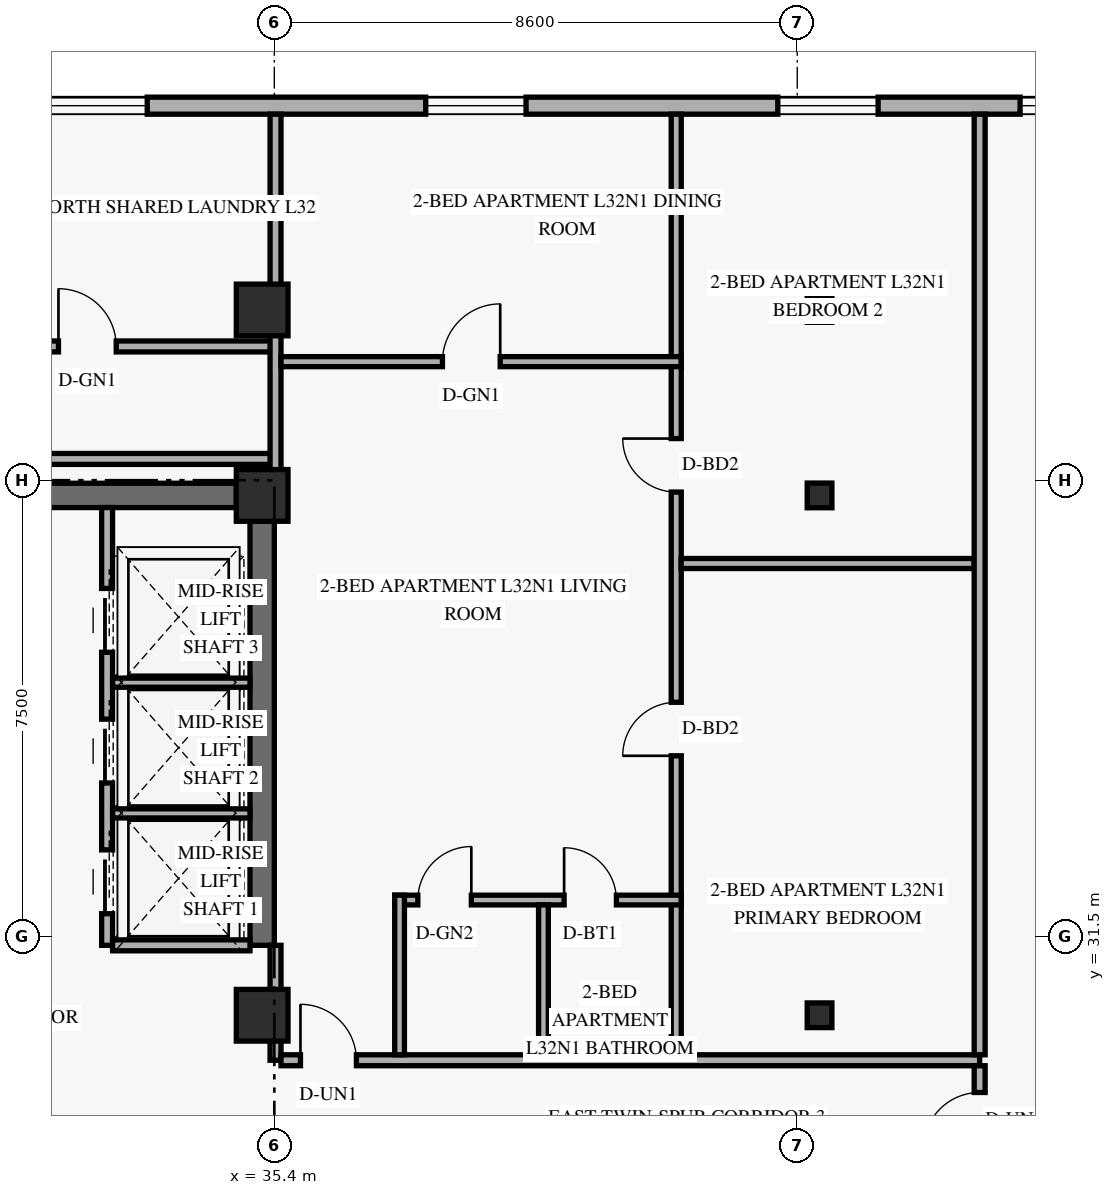
"""IFC4 building model, lengths in metres.
Left out: names, types, materials, properties, quantities, classifications, styles, units other than length and angle.
Written with IfcOpenShell. Run it as: python <this file> out.ifc"""

import sys

from ifc_helpers import new_model, si_unit, direction, frame, frame_2d, origin, origin_2d, place, context, subcontext, project, spatial, rectangle, hollow_rectangle, extrude, element, fill, save


model = new_model("IFC4")
c1 = context("Model", 3, precision=1e-05, world=origin(), true_north=direction((0.0, 1.0)))
c2 = subcontext(c1, "Body", "Model", "MODEL_VIEW")
j1 = project(units=[si_unit("LENGTHUNIT", "METRE"), si_unit("PLANEANGLEUNIT", "RADIAN")], contexts=[c1])
p1 = place(None, origin())
s1 = spatial("IfcSite", under=j1, at=p1, CompositionType="ELEMENT")
p2 = place(p1, origin())
s2 = spatial("IfcBuilding", under=s1, at=p2, CompositionType="ELEMENT")
p3 = place(p2, frame((0.0, 0.0, 124.8)))
s3 = spatial("IfcBuildingStorey", under=s2, at=p3, CompositionType="ELEMENT", Elevation=124.8)
p4 = place(p3, frame((35.2, 31.35, 0.0), z_axis=(0.0, 0.0, 1.0), x_axis=(0.0, 1.0, 0.0)))
e1 = element("IfcWall", 1, at=p4, inside=s3, PredefinedType="SHEAR", context=c2, shape_type="SweptSolid", body=[
    extrude(rectangle(XDim=6.975, YDim=0.4, at=frame_2d((3.487, 0.0))), origin(), (0.0, 0.0, 1.0), 2.749),
])
p5 = place(p3, frame((24.625, 38.75, 0.0), z_axis=(0.0, 0.0, 1.0), x_axis=(1.0, 0.0, 0.0)))
e2 = element("IfcWall", 2, at=p5, inside=s3, PredefinedType="SHEAR", context=c2, shape_type="SweptSolid", body=[
    extrude(rectangle(XDim=10.15, YDim=0.4, at=frame_2d((5.075, 0.0))), origin(), (0.0, 0.0, 1.0), 3.36),
])
p6 = place(p5, frame((5.2, 0.0, 0.0)))
e3 = element("IfcOpeningElement", 3, at=p6, cuts=e2, PredefinedType="OPENING", context=c2, shape_type="SweptSolid", body=[
    extrude(rectangle(XDim=1.05, YDim=2.15, at=frame_2d((0.525, 1.075))), frame((0.0, 0.21, 0.0), z_axis=(0.0, -1.0, 0.0), x_axis=(1.0, 0.0, 0.0)), (0.0, 0.0, 1.0), 0.42),
])
for number, where, z_axis, x_axis in (
    (4, (35.2, 30.2, 0.0), (0.0, 0.0, 1.0), (1.0, 0.0, 0.0)),
    (5, (35.2, 38.75, 0.0), (0.0, 0.0, 1.0), (1.0, 0.0, 0.0)),
    (6, (35.2, 41.8, 0.0), (0.0, 0.0, 1.0), (1.0, 0.0, 0.0)),
):
    element("IfcColumn", number, at=place(p3, frame(where, z_axis=z_axis, x_axis=x_axis)), inside=s3, PredefinedType="COLUMN", context=c2, shape_type="SweptSolid", body=[
        extrude(rectangle(XDim=0.85, YDim=0.85, at=origin_2d()), origin(), (0.0, 0.0, 1.0), 3.6),
    ])
for number, where, z_axis, x_axis in (
    (7, (44.304, 30.2, 0.0), (0.035, 0.0, 0.999), (0.0, 1.0, 0.0)),
    (8, (44.304, 38.75, 0.0), (0.035, 0.0, 0.999), (0.0, 1.0, 0.0)),
    (9, (44.304, 41.8, 0.0), (0.035, 0.0, 0.999), (0.0, 1.0, 0.0)),
):
    element("IfcColumn", number, at=place(p3, frame(where, z_axis=z_axis, x_axis=x_axis)), inside=s3, PredefinedType="COLUMN", context=c2, shape_type="SweptSolid", body=[
        extrude(hollow_rectangle(XDim=0.406, YDim=0.406, WallThickness=0.016, at=origin_2d()), origin(), (0.0, 0.0, 1.0), 3.602),
    ])
p7 = place(p3, frame((49.98, 45.16, 0.0), z_axis=(0.0, 0.0, 1.0), x_axis=(-1.0, 0.0, 0.0)))
e10 = element("IfcWall", 10, at=p7, inside=s3, PredefinedType="SOLIDWALL", context=c2, shape_type="SweptSolid", body=[
    extrude(rectangle(XDim=36.56, YDim=0.28, at=frame_2d((18.28, 0.0))), origin(), (0.0, 0.0, 1.0), 3.36),
])
p8 = place(p7, frame((31.62, 0.0, 0.85)))
e11 = element("IfcOpeningElement", 11, at=p8, cuts=e10, PredefinedType="OPENING", context=c2, shape_type="SweptSolid", body=[
    extrude(rectangle(XDim=1.65, YDim=1.6, at=frame_2d((0.825, 0.8))), frame((0.0, 0.15, 0.0), z_axis=(0.0, -1.0, 0.0), x_axis=(1.0, 0.0, 0.0)), (0.0, 0.0, 1.0), 0.3),
])
p9 = place(p7, frame((23.555, 0.0, 0.85)))
e12 = element("IfcOpeningElement", 12, at=p9, cuts=e10, PredefinedType="OPENING", context=c2, shape_type="SweptSolid", body=[
    extrude(rectangle(XDim=1.65, YDim=1.6, at=frame_2d((0.825, 0.8))), frame((0.0, 0.15, 0.0), z_axis=(0.0, -1.0, 0.0), x_axis=(1.0, 0.0, 0.0)), (0.0, 0.0, 1.0), 0.3),
])
p10 = place(p7, frame((16.67, 0.0, 0.85)))
e13 = element("IfcOpeningElement", 13, at=p10, cuts=e10, PredefinedType="OPENING", context=c2, shape_type="SweptSolid", body=[
    extrude(rectangle(XDim=1.65, YDim=1.6, at=frame_2d((0.825, 0.8))), frame((0.0, 0.15, 0.0), z_axis=(0.0, -1.0, 0.0), x_axis=(1.0, 0.0, 0.0)), (0.0, 0.0, 1.0), 0.3),
])
p11 = place(p7, frame((10.44, 0.0, 0.85)))
e14 = element("IfcOpeningElement", 14, at=p11, cuts=e10, PredefinedType="OPENING", context=c2, shape_type="SweptSolid", body=[
    extrude(rectangle(XDim=1.65, YDim=1.6, at=frame_2d((0.825, 0.8))), frame((0.0, 0.15, 0.0), z_axis=(0.0, -1.0, 0.0), x_axis=(1.0, 0.0, 0.0)), (0.0, 0.0, 1.0), 0.3),
])
p12 = place(p7, frame((4.65, 0.0, 0.85)))
e15 = element("IfcOpeningElement", 15, at=p12, cuts=e10, PredefinedType="OPENING", context=c2, shape_type="SweptSolid", body=[
    extrude(rectangle(XDim=1.65, YDim=1.6, at=frame_2d((0.825, 0.8))), frame((0.0, 0.15, 0.0), z_axis=(0.0, -1.0, 0.0), x_axis=(1.0, 0.0, 0.0)), (0.0, 0.0, 1.0), 0.3),
])
p13 = place(p7, frame((0.665, 0.0, 0.85)))
e16 = element("IfcOpeningElement", 16, at=p13, cuts=e10, PredefinedType="OPENING", context=c2, shape_type="SweptSolid", body=[
    extrude(rectangle(XDim=1.65, YDim=1.6, at=frame_2d((0.825, 0.8))), frame((0.0, 0.15, 0.0), z_axis=(0.0, -1.0, 0.0), x_axis=(1.0, 0.0, 0.0)), (0.0, 0.0, 1.0), 0.3),
])
p14 = place(p3, frame((32.65, 31.35, 0.0), z_axis=(0.0, 0.0, 1.0), x_axis=(0.0, 1.0, 0.0)))
e17 = element("IfcWall", 17, at=p14, inside=s3, PredefinedType="STANDARD", context=c2, shape_type="SweptSolid", body=[
    extrude(rectangle(XDim=7.2, YDim=0.18, at=frame_2d((3.6, 0.0))), origin(), (0.0, 0.0, 1.0), 3.36),
])
p15 = place(p14, frame((0.52, 0.0, 0.0)))
e18 = element("IfcOpeningElement", 18, at=p15, cuts=e17, PredefinedType="OPENING", context=c2, shape_type="SweptSolid", body=[
    extrude(rectangle(XDim=1.05, YDim=2.2, at=frame_2d((0.525, 1.1))), frame((0.0, 0.1, 0.0), z_axis=(0.0, -1.0, 0.0), x_axis=(1.0, 0.0, 0.0)), (0.0, 0.0, 1.0), 0.2),
])
p16 = place(p14, frame((2.67, 0.0, 0.0)))
e19 = element("IfcOpeningElement", 19, at=p16, cuts=e17, PredefinedType="OPENING", context=c2, shape_type="SweptSolid", body=[
    extrude(rectangle(XDim=1.05, YDim=2.2, at=frame_2d((0.525, 1.1))), frame((0.0, 0.1, 0.0), z_axis=(0.0, -1.0, 0.0), x_axis=(1.0, 0.0, 0.0)), (0.0, 0.0, 1.0), 0.2),
])
p17 = place(p14, frame((4.82, 0.0, 0.0)))
e20 = element("IfcOpeningElement", 20, at=p17, cuts=e17, PredefinedType="OPENING", context=c2, shape_type="SweptSolid", body=[
    extrude(rectangle(XDim=1.05, YDim=2.2, at=frame_2d((0.525, 1.1))), frame((0.0, 0.1, 0.0), z_axis=(0.0, -1.0, 0.0), x_axis=(1.0, 0.0, 0.0)), (0.0, 0.0, 1.0), 0.2),
])
p18 = place(p3, frame((32.74, 31.35, 0.0), z_axis=(0.0, 0.0, 1.0), x_axis=(1.0, 0.0, 0.0)))
e21 = element("IfcWall", 21, at=p18, inside=s3, PredefinedType="STANDARD", context=c2, shape_type="SweptSolid", body=[
    extrude(rectangle(XDim=2.26, YDim=0.18, at=frame_2d((1.13, 0.0))), origin(), (0.0, 0.0, 1.0), 3.36),
])
for number, where, z_axis, x_axis in (
    (22, (32.74, 33.52, 0.0), (0.0, 0.0, 1.0), (1.0, 0.0, 0.0)),
    (23, (32.74, 35.67, 0.0), (0.0, 0.0, 1.0), (1.0, 0.0, 0.0)),
):
    element("IfcWall", number, at=place(p3, frame(where, z_axis=z_axis, x_axis=x_axis)), inside=s3, PredefinedType="STANDARD", context=c2, shape_type="SweptSolid", body=[
        extrude(rectangle(XDim=2.26, YDim=0.15, at=frame_2d((1.13, 0.0))), origin(), (0.0, 0.0, 1.0), 3.36),
    ])
p19 = place(p3, frame((35.42, 29.46, 0.0), z_axis=(0.0, 0.0, 1.0), x_axis=(0.0, 1.0, 0.0)))
e24 = element("IfcWall", 24, at=p19, inside=s3, PredefinedType="STANDARD", context=c2, shape_type="SweptSolid", body=[
    extrude(rectangle(XDim=1.89, YDim=0.18, at=frame_2d((0.945, 0.0))), origin(), (0.0, 0.0, 1.0), 2.731),
])
p20 = place(p3, frame((35.51, 29.46, 0.0), z_axis=(0.0, 0.0, 1.0), x_axis=(1.0, 0.0, 0.0)))
e25 = element("IfcWall", 25, at=p20, inside=s3, PredefinedType="STANDARD", context=c2, shape_type="SweptSolid", body=[
    extrude(rectangle(XDim=11.49, YDim=0.18, at=frame_2d((5.745, 0.0))), origin(), (0.0, 0.0, 1.0), 2.731),
])
p21 = place(p20, frame((0.32, 0.0, 0.0)))
e26 = element("IfcOpeningElement", 26, at=p21, cuts=e25, PredefinedType="OPENING", context=c2, shape_type="SweptSolid", body=[
    extrude(rectangle(XDim=0.92, YDim=2.15, at=frame_2d((0.46, 1.075))), frame((0.0, 0.1, 0.0), z_axis=(0.0, -1.0, 0.0), x_axis=(1.0, 0.0, 0.0)), (0.0, 0.0, 1.0), 0.2),
])
p22 = place(p3, frame((21.74, 41.2, 0.0), z_axis=(0.0, 0.0, 1.0), x_axis=(1.0, 0.0, 0.0)))
e27 = element("IfcWall", 27, at=p22, inside=s3, PredefinedType="STANDARD", context=c2, shape_type="SweptSolid", body=[
    extrude(rectangle(XDim=13.68, YDim=0.18, at=frame_2d((6.84, 0.0))), origin(), (0.0, 0.0, 1.0), 2.731),
])
p23 = place(p22, frame((3.09, 0.0, 0.0)))
e28 = element("IfcOpeningElement", 28, at=p23, cuts=e27, PredefinedType="OPENING", context=c2, shape_type="SweptSolid", body=[
    extrude(rectangle(XDim=0.95, YDim=2.15, at=frame_2d((0.475, 1.075))), frame((0.0, 0.1, 0.0), z_axis=(0.0, -1.0, 0.0), x_axis=(1.0, 0.0, 0.0)), (0.0, 0.0, 1.0), 0.2),
])
p24 = place(p22, frame((10.11, 0.0, 0.0)))
e29 = element("IfcOpeningElement", 29, at=p24, cuts=e27, PredefinedType="OPENING", context=c2, shape_type="SweptSolid", body=[
    extrude(rectangle(XDim=0.95, YDim=2.15, at=frame_2d((0.475, 1.075))), frame((0.0, 0.1, 0.0), z_axis=(0.0, -1.0, 0.0), x_axis=(1.0, 0.0, 0.0)), (0.0, 0.0, 1.0), 0.2),
])
p25 = place(p3, frame((23.85, 39.35, 0.0), z_axis=(0.0, 0.0, 1.0), x_axis=(1.0, 0.0, 0.0)))
e30 = element("IfcWall", 30, at=p25, inside=s3, PredefinedType="STANDARD", context=c2, shape_type="SweptSolid", body=[
    extrude(rectangle(XDim=11.57, YDim=0.18, at=frame_2d((5.785, 0.0))), origin(), (0.0, 0.0, 1.0), 2.731),
])
p26 = place(p3, frame((35.42, 38.75, 0.0), z_axis=(0.0, 0.0, 1.0), x_axis=(0.0, 1.0, 0.0)))
e31 = element("IfcWall", 31, at=p26, inside=s3, PredefinedType="PARTITIONING", context=c2, shape_type="SweptSolid", body=[
    extrude(rectangle(XDim=6.27, YDim=0.18, at=frame_2d((3.135, 0.0))), origin(), (0.0, 0.0, 1.0), 2.731),
])
p27 = place(p3, frame((42.01, 29.55, 0.0), z_axis=(0.0, 0.0, 1.0), x_axis=(0.0, 1.0, 0.0)))
e32 = element("IfcWall", 32, at=p27, inside=s3, PredefinedType="PARTITIONING", context=c2, shape_type="SweptSolid", body=[
    extrude(rectangle(XDim=15.47, YDim=0.165, at=frame_2d((7.735, 0.0))), origin(), (0.0, 0.0, 1.0), 2.731),
])
p28 = place(p27, frame((4.917, 0.0, 0.0)))
e33 = element("IfcOpeningElement", 33, at=p28, cuts=e32, PredefinedType="OPENING", context=c2, shape_type="SweptSolid", body=[
    extrude(rectangle(XDim=0.88, YDim=2.14, at=frame_2d((0.44, 1.07))), frame((0.0, 0.093, 0.0), z_axis=(0.0, -1.0, 0.0), x_axis=(1.0, 0.0, 0.0)), (0.0, 0.0, 1.0), 0.185),
])
p29 = place(p27, frame((9.255, 0.0, 0.0)))
e34 = element("IfcOpeningElement", 34, at=p29, cuts=e32, PredefinedType="OPENING", context=c2, shape_type="SweptSolid", body=[
    extrude(rectangle(XDim=0.88, YDim=2.14, at=frame_2d((0.44, 1.07))), frame((0.0, 0.093, 0.0), z_axis=(0.0, -1.0, 0.0), x_axis=(1.0, 0.0, 0.0)), (0.0, 0.0, 1.0), 0.185),
])
p30 = place(p3, frame((37.38, 32.095, 0.0), z_axis=(0.0, 0.0, 1.0), x_axis=(1.0, 0.0, 0.0)))
e35 = element("IfcWall", 35, at=p30, inside=s3, PredefinedType="PLUMBINGWALL", context=c2, shape_type="SweptSolid", body=[
    extrude(rectangle(XDim=4.71, YDim=0.16, at=frame_2d((2.355, 0.0))), origin(), (0.0, 0.0, 1.0), 3.36),
])
p31 = place(p30, frame((0.38, 0.0, 0.0)))
e36 = element("IfcOpeningElement", 36, at=p31, cuts=e35, PredefinedType="OPENING", context=c2, shape_type="SweptSolid", body=[
    extrude(rectangle(XDim=0.88, YDim=2.12, at=frame_2d((0.44, 1.06))), frame((0.0, 0.09, 0.0), z_axis=(0.0, -1.0, 0.0), x_axis=(1.0, 0.0, 0.0)), (0.0, 0.0, 1.0), 0.18),
])
p32 = place(p30, frame((2.786, 0.0, 0.0)))
e37 = element("IfcOpeningElement", 37, at=p32, cuts=e35, PredefinedType="OPENING", context=c2, shape_type="SweptSolid", body=[
    extrude(rectangle(XDim=0.86, YDim=2.12, at=frame_2d((0.43, 1.06))), frame((0.0, 0.09, 0.0), z_axis=(0.0, -1.0, 0.0), x_axis=(1.0, 0.0, 0.0)), (0.0, 0.0, 1.0), 0.18),
])
p33 = place(p3, frame((37.46, 29.55, 0.0), z_axis=(0.0, 0.0, 1.0), x_axis=(0.0, 1.0, 0.0)))
e38 = element("IfcWall", 38, at=p33, inside=s3, PredefinedType="PLUMBINGWALL", context=c2, shape_type="SweptSolid", body=[
    extrude(rectangle(XDim=2.625, YDim=0.16, at=frame_2d((1.312, 0.0))), origin(), (0.0, 0.0, 1.0), 2.731),
])
p34 = place(p3, frame((39.826, 29.55, 0.0), z_axis=(0.0, 0.0, 1.0), x_axis=(0.0, 1.0, 0.0)))
e39 = element("IfcWall", 39, at=p34, inside=s3, PredefinedType="PLUMBINGWALL", context=c2, shape_type="SweptSolid", body=[
    extrude(rectangle(XDim=2.465, YDim=0.16, at=frame_2d((1.232, 0.0))), origin(), (0.0, 0.0, 1.0), 2.731),
])
p35 = place(p3, frame((35.51, 40.95, 0.0), z_axis=(0.0, 0.0, 1.0), x_axis=(1.0, 0.0, 0.0)))
e40 = element("IfcWall", 40, at=p35, inside=s3, PredefinedType="PARTITIONING", context=c2, shape_type="SweptSolid", body=[
    extrude(rectangle(XDim=6.58, YDim=0.165, at=frame_2d((3.29, 0.0))), origin(), (0.0, 0.0, 1.0), 3.36),
])
p36 = place(p35, frame((2.655, 0.0, 0.0)))
e41 = element("IfcOpeningElement", 41, at=p36, cuts=e40, PredefinedType="OPENING", context=c2, shape_type="SweptSolid", body=[
    extrude(rectangle(XDim=0.95, YDim=2.15, at=frame_2d((0.475, 1.075))), frame((0.0, 0.093, 0.0), z_axis=(0.0, -1.0, 0.0), x_axis=(1.0, 0.0, 0.0)), (0.0, 0.0, 1.0), 0.185),
])
p37 = place(p3, frame((42.09, 37.63, 0.0), z_axis=(0.0, 0.0, 1.0), x_axis=(1.0, 0.0, 0.0)))
e42 = element("IfcWall", 42, at=p37, inside=s3, PredefinedType="PARTITIONING", context=c2, shape_type="SweptSolid", body=[
    extrude(rectangle(XDim=4.82, YDim=0.165, at=frame_2d((2.41, 0.0))), origin(), (0.0, 0.0, 1.0), 2.731),
])
p38 = place(p3, frame((47.0, 27.65, 0.0), z_axis=(0.0, 0.0, 1.0), x_axis=(0.0, 1.0, 0.0)))
e43 = element("IfcWall", 43, at=p38, inside=s3, PredefinedType="STANDARD", context=c2, shape_type="SweptSolid", body=[
    extrude(rectangle(XDim=1.72, YDim=0.18, at=frame_2d((0.86, 0.0))), origin(), (0.0, 0.0, 1.0), 3.36),
])
p39 = place(p38, frame((0.36, 0.0, 0.0)))
e44 = element("IfcOpeningElement", 44, at=p39, cuts=e43, PredefinedType="OPENING", context=c2, shape_type="SweptSolid", body=[
    extrude(rectangle(XDim=0.92, YDim=2.15, at=frame_2d((0.46, 1.075))), frame((0.0, 0.1, 0.0), z_axis=(0.0, -1.0, 0.0), x_axis=(1.0, 0.0, 0.0)), (0.0, 0.0, 1.0), 0.2),
])
p40 = place(p3, frame((47.0, 29.55, 0.0), z_axis=(0.0, 0.0, 1.0), x_axis=(0.0, 1.0, 0.0)))
e45 = element("IfcWall", 45, at=p40, inside=s3, PredefinedType="PARTITIONING", context=c2, shape_type="SweptSolid", body=[
    extrude(rectangle(XDim=15.47, YDim=0.18, at=frame_2d((7.735, 0.0))), origin(), (0.0, 0.0, 1.0), 2.731),
])
p41 = place(p10, origin())
e46 = element("IfcWindow", 46, at=p41, inside=s3, PartitioningType="SINGLE_PANEL", PredefinedType="WINDOW", context=c2, shape_type="SweptSolid", body=[
    extrude(rectangle(XDim=1.65, YDim=1.6, at=frame_2d((0.825, 0.8))), frame((0.0, 0.03, 0.0), z_axis=(0.0, -1.0, 0.0), x_axis=(1.0, 0.0, 0.0)), (0.0, 0.0, 1.0), 0.06),
])
fill(e13, e46)
p42 = place(p11, origin())
e47 = element("IfcWindow", 47, at=p42, inside=s3, PartitioningType="SINGLE_PANEL", PredefinedType="WINDOW", context=c2, shape_type="SweptSolid", body=[
    extrude(rectangle(XDim=1.65, YDim=1.6, at=frame_2d((0.825, 0.8))), frame((0.0, 0.03, 0.0), z_axis=(0.0, -1.0, 0.0), x_axis=(1.0, 0.0, 0.0)), (0.0, 0.0, 1.0), 0.06),
])
fill(e14, e47)
p43 = place(p12, origin())
e48 = element("IfcWindow", 48, at=p43, inside=s3, PartitioningType="SINGLE_PANEL", PredefinedType="WINDOW", context=c2, shape_type="SweptSolid", body=[
    extrude(rectangle(XDim=1.65, YDim=1.6, at=frame_2d((0.825, 0.8))), frame((0.0, 0.03, 0.0), z_axis=(0.0, -1.0, 0.0), x_axis=(1.0, 0.0, 0.0)), (0.0, 0.0, 1.0), 0.06),
])
fill(e15, e48)
p44 = place(p13, origin())
e49 = element("IfcWindow", 49, at=p44, inside=s3, PartitioningType="SINGLE_PANEL", PredefinedType="WINDOW", context=c2, shape_type="SweptSolid", body=[
    extrude(rectangle(XDim=1.65, YDim=1.6, at=frame_2d((0.825, 0.8))), frame((0.0, 0.03, 0.0), z_axis=(0.0, -1.0, 0.0), x_axis=(1.0, 0.0, 0.0)), (0.0, 0.0, 1.0), 0.06),
])
fill(e16, e49)
p45 = place(p15, origin())
e50 = element("IfcDoor", 50, at=p45, inside=s3, OperationType="SLIDING_TO_LEFT", PredefinedType="DOOR", context=c2, shape_type="SweptSolid", body=[
    extrude(rectangle(XDim=1.05, YDim=2.2, at=frame_2d((0.525, 1.1))), frame((0.0, 0.025, 0.0), z_axis=(0.0, -1.0, 0.0), x_axis=(1.0, 0.0, 0.0)), (0.0, 0.0, 1.0), 0.05),
])
fill(e18, e50)
p46 = place(p16, origin())
e51 = element("IfcDoor", 51, at=p46, inside=s3, OperationType="SLIDING_TO_LEFT", PredefinedType="DOOR", context=c2, shape_type="SweptSolid", body=[
    extrude(rectangle(XDim=1.05, YDim=2.2, at=frame_2d((0.525, 1.1))), frame((0.0, 0.025, 0.0), z_axis=(0.0, -1.0, 0.0), x_axis=(1.0, 0.0, 0.0)), (0.0, 0.0, 1.0), 0.05),
])
fill(e19, e51)
p47 = place(p17, origin())
e52 = element("IfcDoor", 52, at=p47, inside=s3, OperationType="SLIDING_TO_LEFT", PredefinedType="DOOR", context=c2, shape_type="SweptSolid", body=[
    extrude(rectangle(XDim=1.05, YDim=2.2, at=frame_2d((0.525, 1.1))), frame((0.0, 0.025, 0.0), z_axis=(0.0, -1.0, 0.0), x_axis=(1.0, 0.0, 0.0)), (0.0, 0.0, 1.0), 0.05),
])
fill(e20, e52)
p48 = place(p36, origin())
e53 = element("IfcDoor", 53, at=p48, inside=s3, OperationType="SINGLE_SWING_RIGHT", PredefinedType="DOOR", context=c2, shape_type="SweptSolid", body=[
    extrude(rectangle(XDim=0.95, YDim=2.15, at=frame_2d((0.475, 1.075))), frame((0.0, 0.025, 0.0), z_axis=(0.0, -1.0, 0.0), x_axis=(1.0, 0.0, 0.0)), (0.0, 0.0, 1.0), 0.05),
])
fill(e41, e53)
p49 = place(p21, origin())
e54 = element("IfcDoor", 54, at=p49, inside=s3, OperationType="SINGLE_SWING_LEFT", PredefinedType="DOOR", context=c2, shape_type="SweptSolid", body=[
    extrude(rectangle(XDim=0.92, YDim=2.15, at=frame_2d((0.46, 1.075))), frame((0.0, 0.025, 0.0), z_axis=(0.0, -1.0, 0.0), x_axis=(1.0, 0.0, 0.0)), (0.0, 0.0, 1.0), 0.05),
])
fill(e26, e54)
p50 = place(p31, origin())
e55 = element("IfcDoor", 55, at=p50, inside=s3, OperationType="SINGLE_SWING_RIGHT", PredefinedType="DOOR", context=c2, shape_type="SweptSolid", body=[
    extrude(rectangle(XDim=0.88, YDim=2.12, at=frame_2d((0.44, 1.06))), frame((0.0, 0.025, 0.0), z_axis=(0.0, -1.0, 0.0), x_axis=(1.0, 0.0, 0.0)), (0.0, 0.0, 1.0), 0.05),
])
fill(e36, e55)
p51 = place(p32, origin())
e56 = element("IfcDoor", 56, at=p51, inside=s3, OperationType="SINGLE_SWING_LEFT", PredefinedType="DOOR", context=c2, shape_type="SweptSolid", body=[
    extrude(rectangle(XDim=0.86, YDim=2.12, at=frame_2d((0.43, 1.06))), frame((0.0, 0.025, 0.0), z_axis=(0.0, -1.0, 0.0), x_axis=(1.0, 0.0, 0.0)), (0.0, 0.0, 1.0), 0.05),
])
fill(e37, e56)
p52 = place(p28, origin())
e57 = element("IfcDoor", 57, at=p52, inside=s3, OperationType="SINGLE_SWING_LEFT", PredefinedType="DOOR", context=c2, shape_type="SweptSolid", body=[
    extrude(rectangle(XDim=0.88, YDim=2.14, at=frame_2d((0.44, 1.07))), frame((0.0, 0.025, 0.0), z_axis=(0.0, -1.0, 0.0), x_axis=(1.0, 0.0, 0.0)), (0.0, 0.0, 1.0), 0.05),
])
fill(e33, e57)
p53 = place(p29, origin())
e58 = element("IfcDoor", 58, at=p53, inside=s3, OperationType="SINGLE_SWING_RIGHT", PredefinedType="DOOR", context=c2, shape_type="SweptSolid", body=[
    extrude(rectangle(XDim=0.88, YDim=2.14, at=frame_2d((0.44, 1.07))), frame((0.0, 0.025, 0.0), z_axis=(0.0, -1.0, 0.0), x_axis=(1.0, 0.0, 0.0)), (0.0, 0.0, 1.0), 0.05),
])
fill(e34, e58)
p54 = place(p39, origin())
e59 = element("IfcDoor", 59, at=p54, inside=s3, OperationType="SINGLE_SWING_LEFT", PredefinedType="DOOR", context=c2, shape_type="SweptSolid", body=[
    extrude(rectangle(XDim=0.92, YDim=2.15, at=frame_2d((0.46, 1.075))), frame((0.0, 0.025, 0.0), z_axis=(0.0, -1.0, 0.0), x_axis=(1.0, 0.0, 0.0)), (0.0, 0.0, 1.0), 0.05),
])
fill(e44, e59)
p55 = place(p24, origin())
e60 = element("IfcDoor", 60, at=p55, inside=s3, OperationType="SINGLE_SWING_LEFT", PredefinedType="DOOR", context=c2, shape_type="SweptSolid", body=[
    extrude(rectangle(XDim=0.95, YDim=2.15, at=frame_2d((0.475, 1.075))), frame((0.0, 0.025, 0.0), z_axis=(0.0, -1.0, 0.0), x_axis=(1.0, 0.0, 0.0)), (0.0, 0.0, 1.0), 0.05),
])
fill(e29, e60)
save(model, sys.argv[1])
